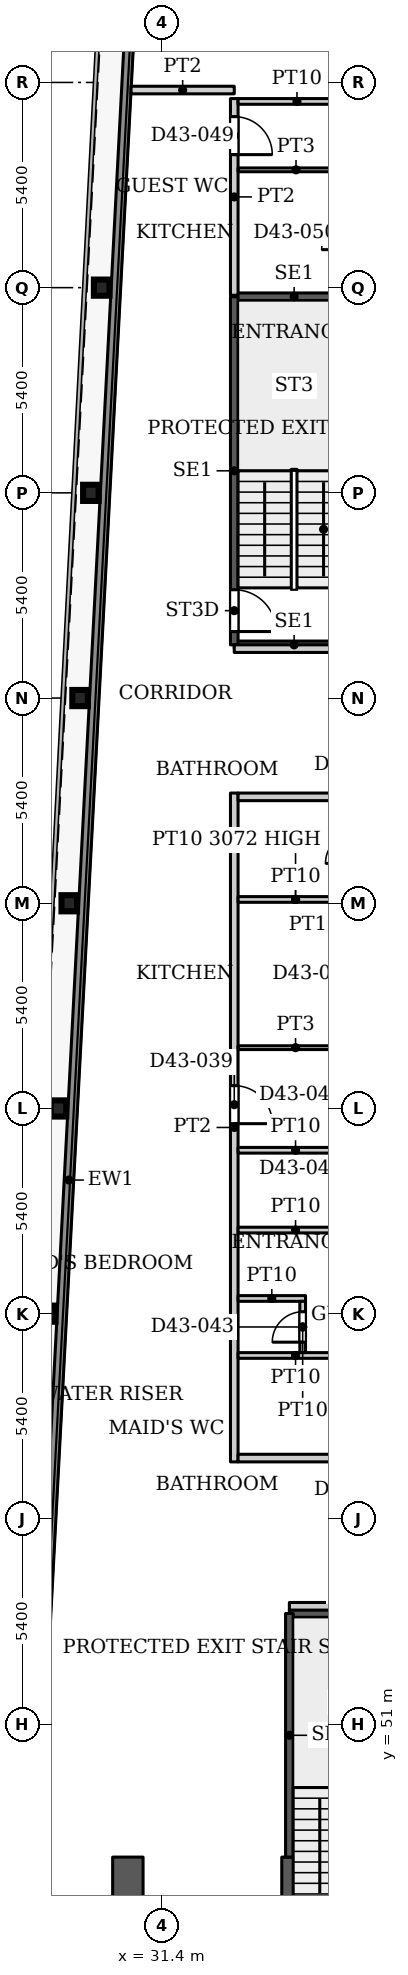
"""IFC4 building model, lengths in metres.
Left out: names, types, materials, properties, quantities, classifications, styles, units other than length and angle.
Written with IfcOpenShell. Run it as: python <this file> out.ifc"""

import sys

from ifc_helpers import new_model, si_unit, direction, frame, frame_2d, origin, origin_2d, place, context, subcontext, project, spatial, rectangle, i_section, extrude, source, transform, mapped, element, fill, save


model = new_model("IFC4")
c1 = context("Model", 3, precision=1e-05, world=origin(), true_north=direction((0.0, 1.0)))
c2 = subcontext(c1, "Body", "Model", "MODEL_VIEW")
j1 = project(units=[si_unit("LENGTHUNIT", "METRE"), si_unit("PLANEANGLEUNIT", "RADIAN")], contexts=[c1])
p1 = place(None, origin())
s1 = spatial("IfcSite", under=j1, at=p1, CompositionType="ELEMENT")
p2 = place(p1, origin())
s2 = spatial("IfcBuilding", under=s1, at=p2, CompositionType="ELEMENT")
p3 = place(p2, frame((0.0, 0.0, 191.6)))
s3 = spatial("IfcBuildingStorey", under=s2, at=p3, CompositionType="ELEMENT", Elevation=191.6)
for number, where, z_axis, x_axis in (
    (1, (28.39, 61.8, 0.0), (0.0, 0.0, 1.0), (1.0, 0.0, 0.0)),
    (2, (28.674, 67.2, 0.0), (0.0, 0.0, 1.0), (1.0, 0.0, 0.0)),
    (3, (28.958, 72.6, 0.0), (0.0, 0.0, 1.0), (1.0, 0.0, 0.0)),
    (4, (29.243, 78.0, 0.0), (0.0, 0.0, 1.0), (1.0, 0.0, 0.0)),
    (5, (29.527, 83.4, 0.0), (0.0, 0.0, 1.0), (1.0, 0.0, 0.0)),
    (6, (29.811, 88.8, 0.0), (0.0, 0.0, 1.0), (1.0, 0.0, 0.0)),
):
    element("IfcColumn", number, at=place(p3, frame(where, z_axis=z_axis, x_axis=x_axis)), inside=s3, PredefinedType="COLUMN", context=c2, shape_type="SweptSolid", body=[
        extrude(i_section(OverallWidth=0.409, OverallDepth=0.425, WebThickness=0.033, FlangeThickness=0.052, FilletRadius=0.013, at=origin_2d()), origin(), (0.0, 0.0, 1.0), 3.9),
    ])
p4 = place(p3, frame((34.75, 29.05, 0.0), z_axis=(0.0, 0.0, 1.0), x_axis=(0.0, 1.0, 0.0)))
e7 = element("IfcWall", 7, at=p4, inside=s3, PredefinedType="SHEAR", context=c2, shape_type="SweptSolid", body=[
    extrude(rectangle(XDim=18.45, YDim=0.4, at=frame_2d((9.225, 0.0))), origin(), (0.0, 0.0, 1.0), 3.9),
])
p5 = place(p4, frame((8.025, 0.0, 0.0)))
e8 = element("IfcOpeningElement", 8, at=p5, cuts=e7, PredefinedType="OPENING", context=c2, shape_type="SweptSolid", body=[
    extrude(rectangle(XDim=1.1, YDim=2.2, at=frame_2d((0.55, 1.1))), frame((0.0, 0.21, 0.0), z_axis=(0.0, -1.0, 0.0), x_axis=(1.0, 0.0, 0.0)), (0.0, 0.0, 1.0), 0.42),
])
p6 = place(p4, frame((10.875, 0.0, 0.0)))
e9 = element("IfcOpeningElement", 9, at=p6, cuts=e7, PredefinedType="OPENING", context=c2, shape_type="SweptSolid", body=[
    extrude(rectangle(XDim=1.1, YDim=2.2, at=frame_2d((0.55, 1.1))), frame((0.0, 0.21, 0.0), z_axis=(0.0, -1.0, 0.0), x_axis=(1.0, 0.0, 0.0)), (0.0, 0.0, 1.0), 0.42),
])
p7 = place(p4, frame((13.725, 0.0, 0.0)))
e10 = element("IfcOpeningElement", 10, at=p7, cuts=e7, PredefinedType="OPENING", context=c2, shape_type="SweptSolid", body=[
    extrude(rectangle(XDim=1.1, YDim=2.2, at=frame_2d((0.55, 1.1))), frame((0.0, 0.21, 0.0), z_axis=(0.0, -1.0, 0.0), x_axis=(1.0, 0.0, 0.0)), (0.0, 0.0, 1.0), 0.42),
])
p8 = place(p4, frame((15.95, 0.0, 0.0)))
e11 = element("IfcOpeningElement", 11, at=p8, cuts=e7, PredefinedType="OPENING", context=c2, shape_type="SweptSolid", body=[
    extrude(rectangle(XDim=1.1, YDim=2.2, at=frame_2d((0.55, 1.1))), frame((0.0, 0.21, 0.0), z_axis=(0.0, -1.0, 0.0), x_axis=(1.0, 0.0, 0.0)), (0.0, 0.0, 1.0), 0.42),
])
p9 = place(p3, frame((30.5, 29.05, 0.0), z_axis=(0.0, 0.0, 1.0), x_axis=(0.0, 1.0, 0.0)))
e12 = element("IfcWall", 12, at=p9, inside=s3, PredefinedType="SHEAR", context=c2, shape_type="SweptSolid", body=[
    extrude(rectangle(XDim=18.45, YDim=0.8, at=frame_2d((9.225, 0.0))), origin(), (0.0, 0.0, 1.0), 3.9),
])
p10 = place(p9, frame((1.5, 0.0, 0.0)))
e13 = element("IfcOpeningElement", 13, at=p10, cuts=e12, PredefinedType="OPENING", context=c2, shape_type="SweptSolid", body=[
    extrude(rectangle(XDim=0.9, YDim=2.2, at=frame_2d((0.45, 1.1))), frame((0.0, 0.41, 0.0), z_axis=(0.0, -1.0, 0.0), x_axis=(1.0, 0.0, 0.0)), (0.0, 0.0, 1.0), 0.82),
])
p11 = place(p9, frame((8.705, 0.0, 0.0)))
e14 = element("IfcOpeningElement", 14, at=p11, cuts=e12, PredefinedType="OPENING", context=c2, shape_type="SweptSolid", body=[
    extrude(rectangle(XDim=0.9, YDim=2.2, at=frame_2d((0.45, 1.1))), frame((0.0, 0.41, 0.0), z_axis=(0.0, -1.0, 0.0), x_axis=(1.0, 0.0, 0.0)), (0.0, 0.0, 1.0), 0.82),
])
p12 = place(p3, frame((27.195, 31.969, 0.0), z_axis=(0.0, 0.0, 1.0), x_axis=(0.052554995867, 0.998618031286, 0.0)))
e15 = element("IfcWall", 15, at=p12, inside=s3, PredefinedType="SOLIDWALL", context=c2, shape_type="SweptSolid", body=[
    extrude(rectangle(XDim=66.787, YDim=0.25, at=frame_2d((33.394, 0.0))), origin(), (0.0, 0.0, 1.0), 3.75),
])
p13 = place(p3, frame((34.75, 53.91, 0.0), z_axis=(0.0, 0.0, 1.0), x_axis=(1.0, 0.0, 0.0)))
e16 = element("IfcWall", 16, at=p13, inside=s3, PredefinedType="SHEAR", context=c2, shape_type="SweptSolid", body=[
    extrude(rectangle(XDim=3.15, YDim=0.2, at=frame_2d((1.575, 0.0))), origin(), (0.0, 0.0, 1.0), 3.9),
])
p14 = place(p3, frame((34.75, 47.5, 0.0), z_axis=(0.0, 0.0, 1.0), x_axis=(0.0, 1.0, 0.0)))
e17 = element("IfcWall", 17, at=p14, inside=s3, PredefinedType="SHEAR", context=c2, shape_type="SweptSolid", body=[
    extrude(rectangle(XDim=6.41, YDim=0.2, at=frame_2d((3.205, 0.0))), origin(), (0.0, 0.0, 1.0), 3.9),
])
for number, where, z_axis, x_axis in (
    (18, (33.3, 79.4, 0.0), (0.0, 0.0, 1.0), (1.0, 0.0, 0.0)),
    (19, (33.3, 88.56, 0.0), (0.0, 0.0, 1.0), (1.0, 0.0, 0.0)),
):
    element("IfcWall", number, at=place(p3, frame(where, z_axis=z_axis, x_axis=x_axis)), inside=s3, PredefinedType="SHEAR", context=c2, shape_type="SweptSolid", body=[
        extrude(rectangle(XDim=3.15, YDim=0.2, at=frame_2d((1.575, 0.0))), origin(), (0.0, 0.0, 1.0), 3.9),
    ])
p15 = place(p3, frame((33.3, 79.4, 0.0), z_axis=(0.0, 0.0, 1.0), x_axis=(0.0, 1.0, 0.0)))
e20 = element("IfcWall", 20, at=p15, inside=s3, PredefinedType="SHEAR", context=c2, shape_type="SweptSolid", body=[
    extrude(rectangle(XDim=9.16, YDim=0.2, at=frame_2d((4.58, 0.0))), origin(), (0.0, 0.0, 1.0), 3.9),
])
p16 = place(p15, frame((0.35, 0.0, 0.0)))
e21 = element("IfcOpeningElement", 21, at=p16, cuts=e20, PredefinedType="OPENING", context=c2, shape_type="SweptSolid", body=[
    extrude(rectangle(XDim=1.1, YDim=2.2, at=frame_2d((0.55, 1.1))), frame((0.0, 0.11, 0.0), z_axis=(0.0, -1.0, 0.0), x_axis=(1.0, 0.0, 0.0)), (0.0, 0.0, 1.0), 0.22),
])
p17 = place(p3, frame((30.585, 94.0, 0.0), z_axis=(0.0, 0.0, 1.0), x_axis=(1.0, 0.0, 0.0)))
e22 = element("IfcWall", 22, at=p17, inside=s3, PredefinedType="PARTITIONING", context=c2, shape_type="SweptSolid", body=[
    extrude(rectangle(XDim=2.715, YDim=0.2, at=frame_2d((1.358, 0.0))), origin(), (0.0, 0.0, 1.0), 3.6),
])
p18 = place(p3, frame((33.3, 57.9, 0.0), z_axis=(0.0, 0.0, 1.0), x_axis=(0.0, 1.0, 0.0)))
e23 = element("IfcWall", 23, at=p18, inside=s3, PredefinedType="PARTITIONING", context=c2, shape_type="SweptSolid", body=[
    extrude(rectangle(XDim=17.6, YDim=0.2, at=frame_2d((8.8, 0.0))), origin(), (0.0, 0.0, 1.0), 3.6),
])
p19 = place(p18, frame((8.9, 0.0, 0.0)))
e24 = element("IfcOpeningElement", 24, at=p19, cuts=e23, PredefinedType="OPENING", context=c2, shape_type="SweptSolid", body=[
    extrude(rectangle(XDim=1.0, YDim=2.1, at=frame_2d((0.5, 1.05))), frame((0.0, 0.11, 0.0), z_axis=(0.0, -1.0, 0.0), x_axis=(1.0, 0.0, 0.0)), (0.0, 0.0, 1.0), 0.22),
])
p20 = place(p3, frame((33.3, 79.3, 0.0), z_axis=(0.0, 0.0, 1.0), x_axis=(1.0, 0.0, 0.0)))
e25 = element("IfcWall", 25, at=p20, inside=s3, PredefinedType="PARTITIONING", context=c2, shape_type="SweptSolid", body=[
    extrude(rectangle(XDim=12.6, YDim=0.2, at=frame_2d((6.3, 0.0))), origin(), (0.0, 0.0, 1.0), 3.6),
])
p21 = place(p20, frame((5.795, 0.0, 0.0)))
e26 = element("IfcOpeningElement", 26, at=p21, cuts=e25, PredefinedType="OPENING", context=c2, shape_type="SweptSolid", body=[
    extrude(rectangle(XDim=1.0, YDim=2.1, at=frame_2d((0.5, 1.05))), frame((0.0, 0.11, 0.0), z_axis=(0.0, -1.0, 0.0), x_axis=(1.0, 0.0, 0.0)), (0.0, 0.0, 1.0), 0.22),
])
p22 = place(p3, frame((33.3, 88.6, 0.0), z_axis=(0.0, 0.0, 1.0), x_axis=(0.0, 1.0, 0.0)))
e27 = element("IfcWall", 27, at=p22, inside=s3, PredefinedType="PARTITIONING", context=c2, shape_type="SweptSolid", body=[
    extrude(rectangle(XDim=5.175, YDim=0.2, at=frame_2d((2.587, 0.0))), origin(), (0.0, 0.0, 1.0), 3.6),
])
p23 = place(p22, frame((3.7, 0.0, 0.0)))
e28 = element("IfcOpeningElement", 28, at=p23, cuts=e27, PredefinedType="OPENING", context=c2, shape_type="SweptSolid", body=[
    extrude(rectangle(XDim=1.0, YDim=2.1, at=frame_2d((0.5, 1.05))), frame((0.0, 0.11, 0.0), z_axis=(0.0, -1.0, 0.0), x_axis=(1.0, 0.0, 0.0)), (0.0, 0.0, 1.0), 0.22),
])
p24 = place(p3, frame((33.4, 58.0, 0.0), z_axis=(0.0, 0.0, 1.0), x_axis=(1.0, 0.0, 0.0)))
e29 = element("IfcWall", 29, at=p24, inside=s3, PredefinedType="PARTITIONING", context=c2, shape_type="SweptSolid", body=[
    extrude(rectangle(XDim=12.5, YDim=0.2, at=frame_2d((6.25, 0.0))), origin(), (0.0, 0.0, 1.0), 3.6),
])
p25 = place(p3, frame((33.4, 60.7, 0.0), z_axis=(0.0, 0.0, 1.0), x_axis=(1.0, 0.0, 0.0)))
e30 = element("IfcWall", 30, at=p25, inside=s3, PredefinedType="PARTITIONING", context=c2, shape_type="SweptSolid", body=[
    extrude(rectangle(XDim=3.025, YDim=0.15, at=frame_2d((1.513, 0.0))), origin(), (0.0, 0.0, 1.0), 3.6),
])
p26 = place(p3, frame((33.4, 62.2, 0.0), z_axis=(0.0, 0.0, 1.0), x_axis=(1.0, 0.0, 0.0)))
e31 = element("IfcWall", 31, at=p26, inside=s3, PredefinedType="PARTITIONING", context=c2, shape_type="SweptSolid", body=[
    extrude(rectangle(XDim=1.775, YDim=0.15, at=frame_2d((0.888, 0.0))), origin(), (0.0, 0.0, 1.0), 3.6),
])
for number, where, z_axis, x_axis in (
    (32, (33.4, 64.0, 0.0), (0.0, 0.0, 1.0), (1.0, 0.0, 0.0)),
    (33, (33.4, 66.1, 0.0), (0.0, 0.0, 1.0), (1.0, 0.0, 0.0)),
):
    element("IfcWall", number, at=place(p3, frame(where, z_axis=z_axis, x_axis=x_axis)), inside=s3, PredefinedType="PARTITIONING", context=c2, shape_type="SweptSolid", body=[
        extrude(rectangle(XDim=3.025, YDim=0.15, at=frame_2d((1.513, 0.0))), origin(), (0.0, 0.0, 1.0), 3.6),
    ])
p27 = place(p3, frame((33.4, 68.8, 0.0), z_axis=(0.0, 0.0, 1.0), x_axis=(1.0, 0.0, 0.0)))
e34 = element("IfcWall", 34, at=p27, inside=s3, PredefinedType="PARTITIONING", context=c2, shape_type="SweptSolid", body=[
    extrude(rectangle(XDim=3.025, YDim=0.1, at=frame_2d((1.513, 0.0))), origin(), (0.0, 0.0, 1.0), 3.6),
])
p28 = place(p3, frame((33.4, 72.7, 0.0), z_axis=(0.0, 0.0, 1.0), x_axis=(1.0, 0.0, 0.0)))
e35 = element("IfcWall", 35, at=p28, inside=s3, PredefinedType="PARTITIONING", context=c2, shape_type="SweptSolid", body=[
    extrude(rectangle(XDim=3.025, YDim=0.15, at=frame_2d((1.513, 0.0))), origin(), (0.0, 0.0, 1.0), 3.072),
])
p29 = place(p3, frame((33.4, 75.4, 0.0), z_axis=(0.0, 0.0, 1.0), x_axis=(1.0, 0.0, 0.0)))
e36 = element("IfcWall", 36, at=p29, inside=s3, PredefinedType="PARTITIONING", context=c2, shape_type="SweptSolid", body=[
    extrude(rectangle(XDim=12.5, YDim=0.2, at=frame_2d((6.25, 0.0))), origin(), (0.0, 0.0, 1.0), 3.6),
])
p30 = place(p3, frame((33.4, 91.9, 0.0), z_axis=(0.0, 0.0, 1.0), x_axis=(1.0, 0.0, 0.0)))
e37 = element("IfcWall", 37, at=p30, inside=s3, PredefinedType="PARTITIONING", context=c2, shape_type="SweptSolid", body=[
    extrude(rectangle(XDim=3.05, YDim=0.1, at=frame_2d((1.525, 0.0))), origin(), (0.0, 0.0, 1.0), 3.6),
])
p31 = place(p3, frame((33.4, 93.7, 0.0), z_axis=(0.0, 0.0, 1.0), x_axis=(1.0, 0.0, 0.0)))
e38 = element("IfcWall", 38, at=p31, inside=s3, PredefinedType="PARTITIONING", context=c2, shape_type="SweptSolid", body=[
    extrude(rectangle(XDim=3.1, YDim=0.15, at=frame_2d((1.55, 0.0))), origin(), (0.0, 0.0, 1.0), 3.6),
])
p32 = place(p3, frame((34.75, 54.1, 0.0), z_axis=(0.0, 0.0, 1.0), x_axis=(1.0, 0.0, 0.0)))
e39 = element("IfcWall", 39, at=p32, inside=s3, PredefinedType="PARTITIONING", context=c2, shape_type="SweptSolid", body=[
    extrude(rectangle(XDim=11.15, YDim=0.2, at=frame_2d((5.575, 0.0))), origin(), (0.0, 0.0, 1.0), 3.6),
])
p33 = place(p32, frame((5.075, 0.0, 0.0)))
e40 = element("IfcOpeningElement", 40, at=p33, cuts=e39, PredefinedType="OPENING", context=c2, shape_type="SweptSolid", body=[
    extrude(rectangle(XDim=1.0, YDim=2.1, at=frame_2d((0.5, 1.05))), frame((0.0, 0.11, 0.0), z_axis=(0.0, -1.0, 0.0), x_axis=(1.0, 0.0, 0.0)), (0.0, 0.0, 1.0), 0.22),
])
p34 = place(p3, frame((35.1, 60.775, 0.0), z_axis=(0.0, 0.0, 1.0), x_axis=(0.0, 1.0, 0.0)))
e41 = element("IfcWall", 41, at=p34, inside=s3, PredefinedType="PARTITIONING", context=c2, shape_type="SweptSolid", body=[
    extrude(rectangle(XDim=1.35, YDim=0.15, at=frame_2d((0.675, 0.0))), origin(), (0.0, 0.0, 1.0), 3.6),
])
p35 = place(p34, frame((0.275, 0.0, 0.0)))
e42 = element("IfcOpeningElement", 42, at=p35, cuts=e41, PredefinedType="OPENING", context=c2, shape_type="SweptSolid", body=[
    extrude(rectangle(XDim=0.8, YDim=2.1, at=frame_2d((0.4, 1.05))), frame((0.0, 0.085, 0.0), z_axis=(0.0, -1.0, 0.0), x_axis=(1.0, 0.0, 0.0)), (0.0, 0.0, 1.0), 0.17),
])
m1 = source(origin(), c2, "Body", "SweptSolid", [
    extrude(rectangle(XDim=1.1, YDim=2.2, at=frame_2d((0.55, 1.1))), frame((0.0, 0.025, 0.0), z_axis=(0.0, -1.0, 0.0), x_axis=(1.0, 0.0, 0.0)), (0.0, 0.0, 1.0), 0.05),
])
p36 = place(p16, origin())
e43 = element("IfcDoor", 43, at=p36, inside=s3, OperationType="SINGLE_SWING_RIGHT", PredefinedType="DOOR", context=c2, shape_type="MappedRepresentation", body=[
    mapped(m1, transform((0.0, 0.0, 0.0), x_axis=(1.0, 0.0, 0.0), y_axis=(0.0, 1.0, 0.0), z_axis=(0.0, 0.0, 1.0), scale=1.0)),
])
fill(e21, e43)
m2 = source(origin(), c2, "Body", "SweptSolid", [
    extrude(rectangle(XDim=1.0, YDim=2.1, at=frame_2d((0.5, 1.05))), frame((0.0, 0.025, 0.0), z_axis=(0.0, -1.0, 0.0), x_axis=(1.0, 0.0, 0.0)), (0.0, 0.0, 1.0), 0.05),
])
p37 = place(p19, origin())
e44 = element("IfcDoor", 44, at=p37, inside=s3, OperationType="SINGLE_SWING_RIGHT", PredefinedType="DOOR", context=c2, shape_type="MappedRepresentation", body=[
    mapped(m2, transform((0.0, 0.0, 0.0), x_axis=(1.0, 0.0, 0.0), y_axis=(0.0, 1.0, 0.0), z_axis=(0.0, 0.0, 1.0), scale=1.0)),
])
fill(e24, e44)
m3 = source(origin(), c2, "Body", "SweptSolid", [
    extrude(rectangle(XDim=0.8, YDim=2.1, at=frame_2d((0.4, 1.05))), frame((0.0, 0.025, 0.0), z_axis=(0.0, -1.0, 0.0), x_axis=(1.0, 0.0, 0.0)), (0.0, 0.0, 1.0), 0.05),
])
p38 = place(p35, origin())
e45 = element("IfcDoor", 45, at=p38, inside=s3, OperationType="SINGLE_SWING_LEFT", PredefinedType="DOOR", context=c2, shape_type="MappedRepresentation", body=[
    mapped(m3, transform((0.0, 0.0, 0.0), x_axis=(1.0, 0.0, 0.0), y_axis=(0.0, 1.0, 0.0), z_axis=(0.0, 0.0, 1.0), scale=1.0)),
])
fill(e42, e45)
p39 = place(p23, origin())
e46 = element("IfcDoor", 46, at=p39, inside=s3, OperationType="SINGLE_SWING_RIGHT", PredefinedType="DOOR", context=c2, shape_type="MappedRepresentation", body=[
    mapped(m2, transform((0.0, 0.0, 0.0), x_axis=(1.0, 0.0, 0.0), y_axis=(0.0, 1.0, 0.0), z_axis=(0.0, 0.0, 1.0), scale=1.0)),
])
fill(e28, e46)
save(model, sys.argv[1])
